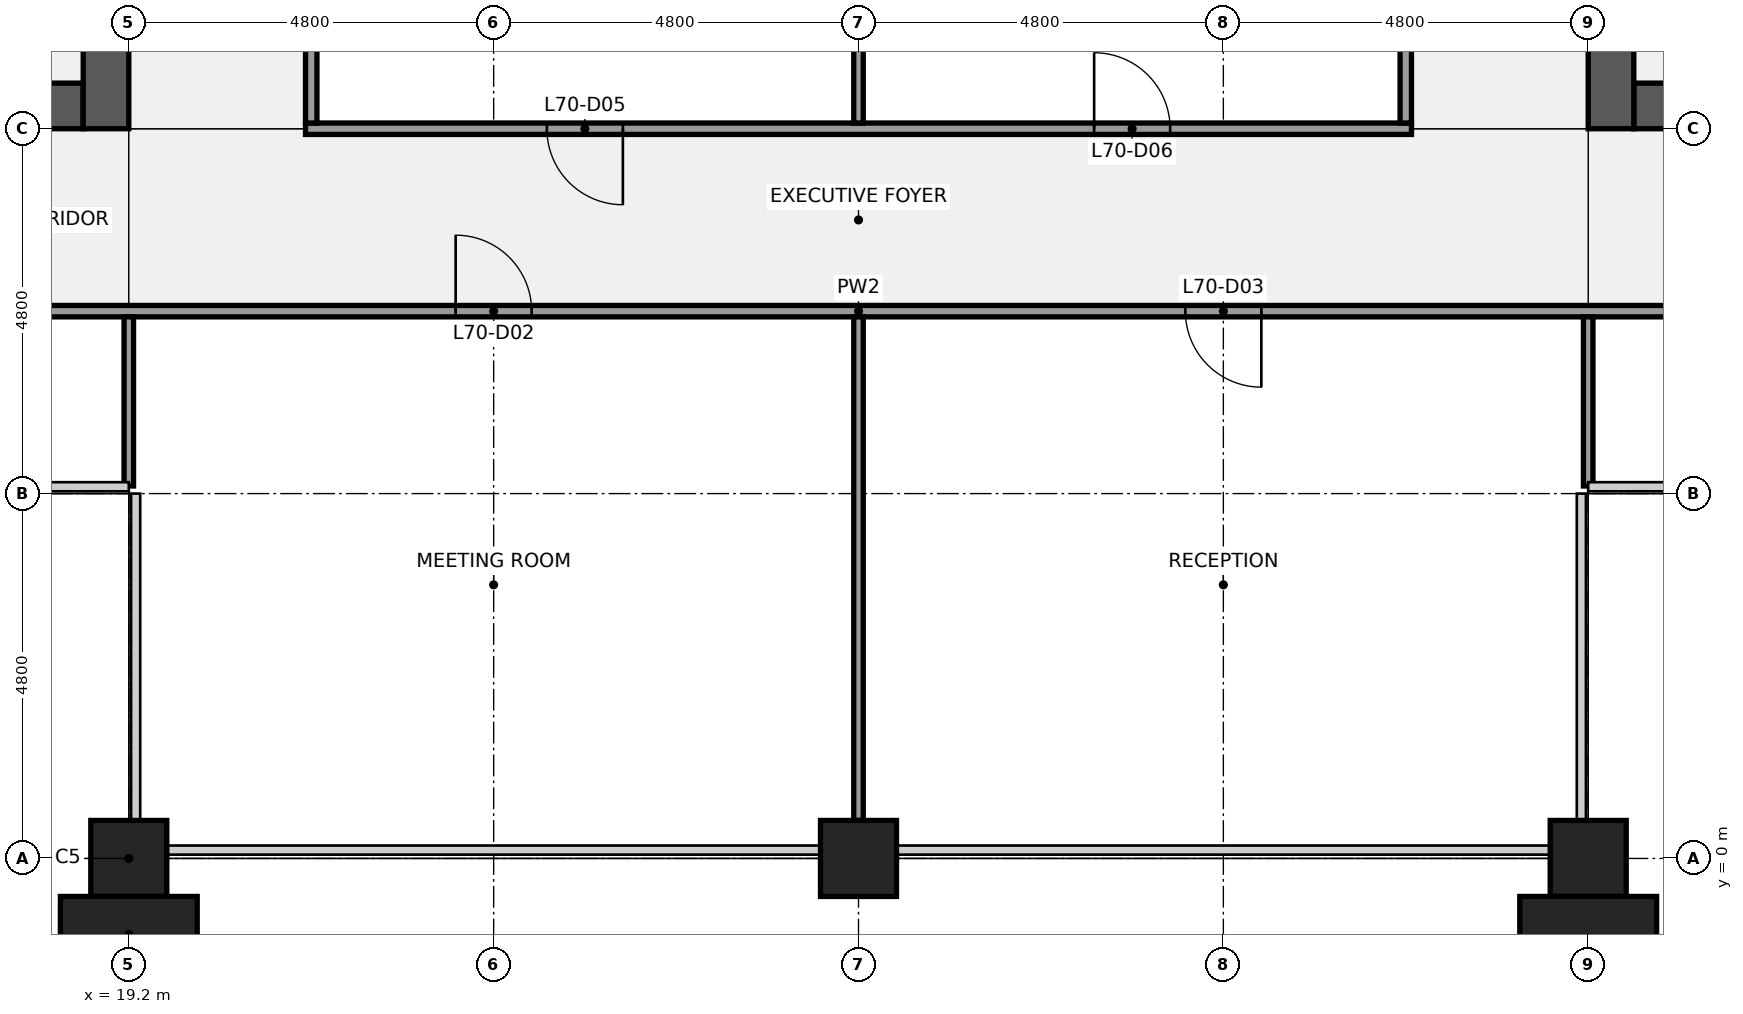
"""IFC4 building model, lengths in metres.
Left out: names, types, materials, properties, quantities, classifications, styles, units other than length and angle.
Written with IfcOpenShell. Run it as: python <this file> out.ifc"""

import sys

from ifc_helpers import new_model, si_unit, direction, frame, frame_2d, origin, origin_2d, place, context, subcontext, project, spatial, rectangle, extrude, element, fill, save


model = new_model("IFC4")
c1 = context("Model", 3, precision=1e-05, world=origin(), true_north=direction((0.0, 1.0)))
c2 = subcontext(c1, "Body", "Model", "MODEL_VIEW")
j1 = project(units=[si_unit("LENGTHUNIT", "METRE"), si_unit("PLANEANGLEUNIT", "RADIAN")], contexts=[c1])
p1 = place(None, origin())
s1 = spatial("IfcSite", under=j1, at=p1, CompositionType="ELEMENT")
p2 = place(p1, origin())
s2 = spatial("IfcBuilding", under=s1, at=p2, CompositionType="ELEMENT")
p3 = place(p2, frame((0.0, 0.0, 318.3)))
s3 = spatial("IfcBuildingStorey", under=s2, at=p3, CompositionType="ELEMENT", Elevation=318.3)
for number, where, z_axis, x_axis in (
    (1, (19.2, 0.0, 0.0), (0.0, 0.0, 1.0), (1.0, 0.0, 0.0)),
    (2, (28.8, 0.0, 0.0), (0.0, 0.0, 1.0), (1.0, 0.0, 0.0)),
    (3, (38.4, 0.0, 0.0), (0.0, 0.0, 1.0), (1.0, 0.0, 0.0)),
):
    element("IfcColumn", number, at=place(p3, frame(where, z_axis=z_axis, x_axis=x_axis)), inside=s3, PredefinedType="COLUMN", context=c2, shape_type="SweptSolid", body=[
        extrude(rectangle(XDim=1.0, YDim=1.0, at=origin_2d()), origin(), (0.0, 0.0, 1.0), 4.0),
    ])
p4 = place(p3, frame((18.6, 9.9, 0.0), z_axis=(0.0, 0.0, 1.0), x_axis=(-1.0, 0.0, 0.0)))
e4 = element("IfcWall", 4, at=p4, inside=s3, PredefinedType="SHEAR", context=c2, shape_type="SweptSolid", body=[
    extrude(rectangle(XDim=4.2, YDim=0.6, at=frame_2d((2.1, 0.0))), origin(), (0.0, 0.0, 1.0), 3.84),
])
p5 = place(p4, frame((1.25, 0.0, 0.0)))
e5 = element("IfcOpeningElement", 5, at=p5, cuts=e4, PredefinedType="OPENING", context=c2, shape_type="SweptSolid", body=[
    extrude(rectangle(XDim=1.1, YDim=2.1, at=frame_2d((0.55, 1.05))), frame((0.0, 0.31, 0.0), z_axis=(0.0, -1.0, 0.0), x_axis=(1.0, 0.0, 0.0)), (0.0, 0.0, 1.0), 0.62),
])
p6 = place(p3, frame((18.9, 38.4, 0.0), z_axis=(0.0, 0.0, 1.0), x_axis=(0.0, -1.0, 0.0)))
e6 = element("IfcWall", 6, at=p6, inside=s3, PredefinedType="SHEAR", context=c2, shape_type="SweptSolid", body=[
    extrude(rectangle(XDim=28.8, YDim=0.6, at=frame_2d((14.4, 0.0))), origin(), (0.0, 0.0, 1.0), 3.84),
])
p7 = place(p6, frame((18.3, 0.0, 0.0)))
e7 = element("IfcOpeningElement", 7, at=p7, cuts=e6, PredefinedType="OPENING", context=c2, shape_type="SweptSolid", body=[
    extrude(rectangle(XDim=1.8, YDim=2.1, at=frame_2d((0.9, 1.05))), frame((0.0, 0.31, 0.0), z_axis=(0.0, -1.0, 0.0), x_axis=(1.0, 0.0, 0.0)), (0.0, 0.0, 1.0), 0.62),
])
p8 = place(p6, frame((8.7, 0.0, 0.0)))
e8 = element("IfcOpeningElement", 8, at=p8, cuts=e6, PredefinedType="OPENING", context=c2, shape_type="SweptSolid", body=[
    extrude(rectangle(XDim=1.8, YDim=2.1, at=frame_2d((0.9, 1.05))), frame((0.0, 0.31, 0.0), z_axis=(0.0, -1.0, 0.0), x_axis=(1.0, 0.0, 0.0)), (0.0, 0.0, 1.0), 0.62),
])
p9 = place(p3, frame((43.2, 9.9, 0.0), z_axis=(0.0, 0.0, 1.0), x_axis=(-1.0, 0.0, 0.0)))
e9 = element("IfcWall", 9, at=p9, inside=s3, PredefinedType="SHEAR", context=c2, shape_type="SweptSolid", body=[
    extrude(rectangle(XDim=4.2, YDim=0.6, at=frame_2d((2.1, 0.0))), origin(), (0.0, 0.0, 1.0), 3.84),
])
p10 = place(p9, frame((1.85, 0.0, 0.0)))
e10 = element("IfcOpeningElement", 10, at=p10, cuts=e9, PredefinedType="OPENING", context=c2, shape_type="SweptSolid", body=[
    extrude(rectangle(XDim=1.1, YDim=2.1, at=frame_2d((0.55, 1.05))), frame((0.0, 0.31, 0.0), z_axis=(0.0, -1.0, 0.0), x_axis=(1.0, 0.0, 0.0)), (0.0, 0.0, 1.0), 0.62),
])
p11 = place(p3, frame((38.7, 9.6, 0.0), z_axis=(0.0, 0.0, 1.0), x_axis=(0.0, 1.0, 0.0)))
e11 = element("IfcWall", 11, at=p11, inside=s3, PredefinedType="SHEAR", context=c2, shape_type="SweptSolid", body=[
    extrude(rectangle(XDim=28.8, YDim=0.6, at=frame_2d((14.4, 0.0))), origin(), (0.0, 0.0, 1.0), 3.84),
])
p12 = place(p11, frame((8.7, 0.0, 0.0)))
e12 = element("IfcOpeningElement", 12, at=p12, cuts=e11, PredefinedType="OPENING", context=c2, shape_type="SweptSolid", body=[
    extrude(rectangle(XDim=1.8, YDim=2.1, at=frame_2d((0.9, 1.05))), frame((0.0, 0.31, 0.0), z_axis=(0.0, -1.0, 0.0), x_axis=(1.0, 0.0, 0.0)), (0.0, 0.0, 1.0), 0.62),
])
p13 = place(p11, frame((18.3, 0.0, 0.0)))
e13 = element("IfcOpeningElement", 13, at=p13, cuts=e11, PredefinedType="OPENING", context=c2, shape_type="SweptSolid", body=[
    extrude(rectangle(XDim=1.8, YDim=2.1, at=frame_2d((0.9, 1.05))), frame((0.0, 0.31, 0.0), z_axis=(0.0, -1.0, 0.0), x_axis=(1.0, 0.0, 0.0)), (0.0, 0.0, 1.0), 0.62),
])
p14 = place(p3, frame((14.5, 7.2, 0.0), z_axis=(0.0, 0.0, 1.0), x_axis=(1.0, 0.0, 0.0)))
e14 = element("IfcWall", 14, at=p14, inside=s3, PredefinedType="PARTITIONING", context=c2, shape_type="SweptSolid", body=[
    extrude(rectangle(XDim=28.6, YDim=0.15, at=frame_2d((14.3, 0.0))), origin(), (0.0, 0.0, 1.0), 2.87),
])
p15 = place(p14, frame((1.85, 0.0, 0.0)))
e15 = element("IfcOpeningElement", 15, at=p15, cuts=e14, PredefinedType="OPENING", context=c2, shape_type="SweptSolid", body=[
    extrude(rectangle(XDim=1.0, YDim=2.1, at=frame_2d((0.5, 1.05))), frame((0.0, 0.085, 0.0), z_axis=(0.0, -1.0, 0.0), x_axis=(1.0, 0.0, 0.0)), (0.0, 0.0, 1.0), 0.17),
])
p16 = place(p14, frame((9.0, 0.0, 0.0)))
e16 = element("IfcOpeningElement", 16, at=p16, cuts=e14, PredefinedType="OPENING", context=c2, shape_type="SweptSolid", body=[
    extrude(rectangle(XDim=1.0, YDim=2.1, at=frame_2d((0.5, 1.05))), frame((0.0, 0.085, 0.0), z_axis=(0.0, -1.0, 0.0), x_axis=(1.0, 0.0, 0.0)), (0.0, 0.0, 1.0), 0.17),
])
p17 = place(p14, frame((18.6, 0.0, 0.0)))
e17 = element("IfcOpeningElement", 17, at=p17, cuts=e14, PredefinedType="OPENING", context=c2, shape_type="SweptSolid", body=[
    extrude(rectangle(XDim=1.0, YDim=2.1, at=frame_2d((0.5, 1.05))), frame((0.0, 0.085, 0.0), z_axis=(0.0, -1.0, 0.0), x_axis=(1.0, 0.0, 0.0)), (0.0, 0.0, 1.0), 0.17),
])
p18 = place(p14, frame((25.75, 0.0, 0.0)))
e18 = element("IfcOpeningElement", 18, at=p18, cuts=e14, PredefinedType="OPENING", context=c2, shape_type="SweptSolid", body=[
    extrude(rectangle(XDim=1.0, YDim=2.1, at=frame_2d((0.5, 1.05))), frame((0.0, 0.085, 0.0), z_axis=(0.0, -1.0, 0.0), x_axis=(1.0, 0.0, 0.0)), (0.0, 0.0, 1.0), 0.17),
])
p19 = place(p3, frame((21.525, 9.6, 0.0), z_axis=(0.0, 0.0, 1.0), x_axis=(1.0, 0.0, 0.0)))
e19 = element("IfcWall", 19, at=p19, inside=s3, PredefinedType="PARTITIONING", context=c2, shape_type="SweptSolid", body=[
    extrude(rectangle(XDim=14.55, YDim=0.15, at=frame_2d((7.275, 0.0))), origin(), (0.0, 0.0, 1.0), 2.87),
])
p20 = place(p19, frame((3.175, 0.0, 0.0)))
e20 = element("IfcOpeningElement", 20, at=p20, cuts=e19, PredefinedType="OPENING", context=c2, shape_type="SweptSolid", body=[
    extrude(rectangle(XDim=1.0, YDim=2.1, at=frame_2d((0.5, 1.05))), frame((0.0, 0.085, 0.0), z_axis=(0.0, -1.0, 0.0), x_axis=(1.0, 0.0, 0.0)), (0.0, 0.0, 1.0), 0.17),
])
p21 = place(p19, frame((10.375, 0.0, 0.0)))
e21 = element("IfcOpeningElement", 21, at=p21, cuts=e19, PredefinedType="OPENING", context=c2, shape_type="SweptSolid", body=[
    extrude(rectangle(XDim=1.0, YDim=2.1, at=frame_2d((0.5, 1.05))), frame((0.0, 0.085, 0.0), z_axis=(0.0, -1.0, 0.0), x_axis=(1.0, 0.0, 0.0)), (0.0, 0.0, 1.0), 0.17),
])
p22 = place(p3, frame((19.2, 4.9, 0.0), z_axis=(0.0, 0.0, 1.0), x_axis=(0.0, 1.0, 0.0)))
e22 = element("IfcWall", 22, at=p22, inside=s3, PredefinedType="PARTITIONING", context=c2, shape_type="SweptSolid", body=[
    extrude(rectangle(XDim=2.225, YDim=0.125, at=frame_2d((1.113, 0.0))), origin(), (0.0, 0.0, 1.0), 2.87),
])
p23 = place(p3, frame((21.6, 9.675, 0.0), z_axis=(0.0, 0.0, 1.0), x_axis=(0.0, 1.0, 0.0)))
e23 = element("IfcWall", 23, at=p23, inside=s3, PredefinedType="PARTITIONING", context=c2, shape_type="SweptSolid", body=[
    extrude(rectangle(XDim=4.65, YDim=0.15, at=frame_2d((2.325, 0.0))), origin(), (0.0, 0.0, 1.0), 2.87),
])
p24 = place(p3, frame((28.8, 0.5, 0.0), z_axis=(0.0, 0.0, 1.0), x_axis=(0.0, 1.0, 0.0)))
e24 = element("IfcWall", 24, at=p24, inside=s3, PredefinedType="PARTITIONING", context=c2, shape_type="SweptSolid", body=[
    extrude(rectangle(XDim=6.625, YDim=0.125, at=frame_2d((3.312, 0.0))), origin(), (0.0, 0.0, 1.0), 2.87),
])
p25 = place(p3, frame((28.8, 9.675, 0.0), z_axis=(0.0, 0.0, 1.0), x_axis=(0.0, 1.0, 0.0)))
e25 = element("IfcWall", 25, at=p25, inside=s3, PredefinedType="PARTITIONING", context=c2, shape_type="SweptSolid", body=[
    extrude(rectangle(XDim=4.662, YDim=0.125, at=frame_2d((2.331, 0.0))), origin(), (0.0, 0.0, 1.0), 2.87),
])
p26 = place(p3, frame((36.0, 9.675, 0.0), z_axis=(0.0, 0.0, 1.0), x_axis=(0.0, 1.0, 0.0)))
e26 = element("IfcWall", 26, at=p26, inside=s3, PredefinedType="PARTITIONING", context=c2, shape_type="SweptSolid", body=[
    extrude(rectangle(XDim=4.65, YDim=0.15, at=frame_2d((2.325, 0.0))), origin(), (0.0, 0.0, 1.0), 2.87),
])
p27 = place(p3, frame((38.4, 4.9, 0.0), z_axis=(0.0, 0.0, 1.0), x_axis=(0.0, 1.0, 0.0)))
e27 = element("IfcWall", 27, at=p27, inside=s3, PredefinedType="PARTITIONING", context=c2, shape_type="SweptSolid", body=[
    extrude(rectangle(XDim=2.225, YDim=0.125, at=frame_2d((1.113, 0.0))), origin(), (0.0, 0.0, 1.0), 2.87),
])
for number, where, z_axis, x_axis in (
    (28, (19.2, -1.0, 0.0), (0.0, 0.0, 1.0), (1.0, 0.0, 0.0)),
    (29, (38.4, -1.0, 0.0), (0.0, 0.0, 1.0), (1.0, 0.0, 0.0)),
):
    element("IfcColumn", number, at=place(p3, frame(where, z_axis=z_axis, x_axis=x_axis)), inside=s3, PredefinedType="PILASTER", context=c2, shape_type="SweptSolid", body=[
        extrude(rectangle(XDim=1.8, YDim=1.0, at=origin_2d()), origin(), (0.0, 0.0, 1.0), 4.0),
    ])
p28 = place(p16, origin())
e30 = element("IfcDoor", 30, at=p28, inside=s3, OperationType="SINGLE_SWING_LEFT", PredefinedType="DOOR", context=c2, shape_type="SweptSolid", body=[
    extrude(rectangle(XDim=1.0, YDim=2.1, at=frame_2d((0.5, 1.05))), frame((0.0, 0.025, 0.0), z_axis=(0.0, -1.0, 0.0), x_axis=(1.0, 0.0, 0.0)), (0.0, 0.0, 1.0), 0.05),
])
fill(e16, e30)
p29 = place(p17, origin())
e31 = element("IfcDoor", 31, at=p29, inside=s3, OperationType="SINGLE_SWING_RIGHT", PredefinedType="DOOR", context=c2, shape_type="SweptSolid", body=[
    extrude(rectangle(XDim=1.0, YDim=2.1, at=frame_2d((0.5, 1.05))), frame((0.0, 0.025, 0.0), z_axis=(0.0, -1.0, 0.0), x_axis=(1.0, 0.0, 0.0)), (0.0, 0.0, 1.0), 0.05),
])
fill(e17, e31)
p30 = place(p20, origin())
e32 = element("IfcDoor", 32, at=p30, inside=s3, OperationType="SINGLE_SWING_RIGHT", PredefinedType="DOOR", context=c2, shape_type="SweptSolid", body=[
    extrude(rectangle(XDim=1.0, YDim=2.1, at=frame_2d((0.5, 1.05))), frame((0.0, 0.025, 0.0), z_axis=(0.0, -1.0, 0.0), x_axis=(1.0, 0.0, 0.0)), (0.0, 0.0, 1.0), 0.05),
])
fill(e20, e32)
p31 = place(p21, origin())
e33 = element("IfcDoor", 33, at=p31, inside=s3, OperationType="SINGLE_SWING_LEFT", PredefinedType="DOOR", context=c2, shape_type="SweptSolid", body=[
    extrude(rectangle(XDim=1.0, YDim=2.1, at=frame_2d((0.5, 1.05))), frame((0.0, 0.025, 0.0), z_axis=(0.0, -1.0, 0.0), x_axis=(1.0, 0.0, 0.0)), (0.0, 0.0, 1.0), 0.05),
])
fill(e21, e33)
save(model, sys.argv[1])
